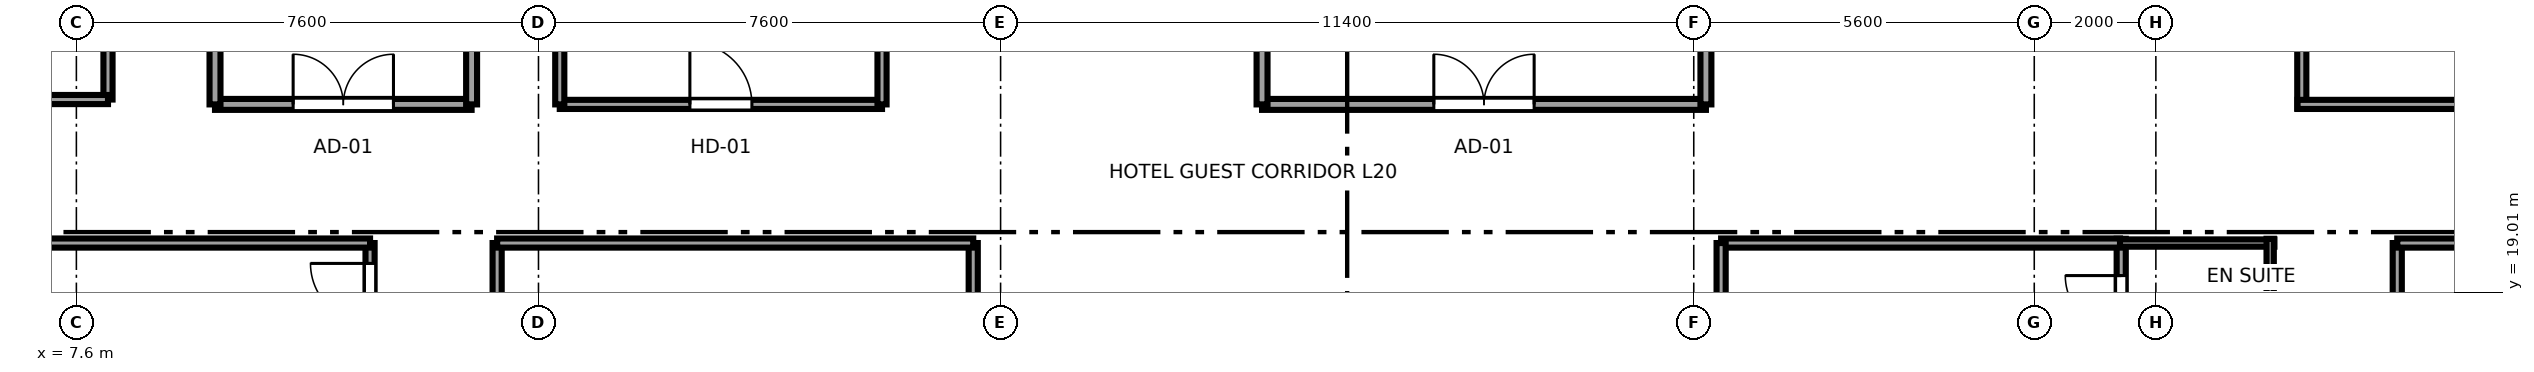
"""IFC4 building model, lengths in metres.
Left out: names, types, materials, properties, quantities, classifications, styles, units other than length and angle.
Written with IfcOpenShell. Run it as: python <this file> out.ifc"""

import sys

from ifc_helpers import new_model, si_unit, direction, frame, frame_2d, origin, place, context, subcontext, project, spatial, rectangle, extrude, source, transform, mapped, element, fill, save


model = new_model("IFC4")
c1 = context("Model", 3, precision=1e-05, world=origin(), true_north=direction((0.0, 1.0)))
c2 = subcontext(c1, "Body", "Model", "MODEL_VIEW")
j1 = project(units=[si_unit("LENGTHUNIT", "METRE"), si_unit("PLANEANGLEUNIT", "RADIAN")], contexts=[c1])
p1 = place(None, origin())
s1 = spatial("IfcSite", under=j1, at=p1, CompositionType="ELEMENT")
p2 = place(p1, origin())
s2 = spatial("IfcBuilding", under=s1, at=p2, CompositionType="ELEMENT")
p3 = place(p2, frame((0.0, 0.0, 81.7)))
s3 = spatial("IfcBuildingStorey", under=s2, at=p3, CompositionType="ELEMENT", Elevation=81.7)
p4 = place(p3, frame((41.23, 17.9, 0.0), z_axis=(0.0, 0.0, 1.0), x_axis=(0.0, 1.0, 0.0)))
e1 = element("IfcWall", 1, at=p4, inside=s3, PredefinedType="PARTITIONING", context=c2, shape_type="SweptSolid", body=[
    extrude(rectangle(XDim=1.99, YDim=0.15, at=frame_2d((0.995, 0.0))), origin(), (0.0, 0.0, 1.0), 3.37),
])
p5 = place(p4, frame((0.465, 0.0, 0.0)))
e2 = element("IfcOpeningElement", 2, at=p5, cuts=e1, PredefinedType="OPENING", context=c2, shape_type="SweptSolid", body=[
    extrude(rectangle(XDim=0.92, YDim=2.01, at=frame_2d((0.46, 1.005))), frame((0.0, 0.085, 0.0), z_axis=(0.0, -1.0, 0.0), x_axis=(1.0, 0.0, 0.0)), (0.0, 0.0, 1.0), 0.17),
])
p6 = place(p3, frame((41.16, 19.82, 0.0), z_axis=(0.0, 0.0, 1.0), x_axis=(1.0, 0.0, 0.0)))
e3 = element("IfcWall", 3, at=p6, inside=s3, PredefinedType="PLUMBINGWALL", context=c2, shape_type="SweptSolid", body=[
    extrude(rectangle(XDim=2.59, YDim=0.12, at=frame_2d((1.295, 0.0))), origin(), (0.0, 0.0, 1.0), 3.37),
])
p7 = place(p3, frame((43.68, 17.9, 0.0), z_axis=(0.0, 0.0, 1.0), x_axis=(0.0, 1.0, 0.0)))
e4 = element("IfcWall", 4, at=p7, inside=s3, PredefinedType="PLUMBINGWALL", context=c2, shape_type="SweptSolid", body=[
    extrude(rectangle(XDim=1.99, YDim=0.12, at=frame_2d((0.995, 0.0))), origin(), (0.0, 0.0, 1.0), 3.37),
])
p8 = place(p3, frame((12.43, 18.21, 0.0), z_axis=(0.0, 0.0, 1.0), x_axis=(0.0, 1.0, 0.0)))
e5 = element("IfcWall", 5, at=p8, inside=s3, PredefinedType="PARTITIONING", context=c2, shape_type="SweptSolid", body=[
    extrude(rectangle(XDim=1.61, YDim=0.15, at=frame_2d((0.805, 0.0))), origin(), (0.0, 0.0, 1.0), 3.37),
])
p9 = place(p8, frame((0.295, 0.0, 0.0)))
e6 = element("IfcOpeningElement", 6, at=p9, cuts=e5, PredefinedType="OPENING", context=c2, shape_type="SweptSolid", body=[
    extrude(rectangle(XDim=0.98, YDim=2.12, at=frame_2d((0.49, 1.06))), frame((0.0, 0.085, 0.0), z_axis=(0.0, -1.0, 0.0), x_axis=(1.0, 0.0, 0.0)), (0.0, 0.0, 1.0), 0.17),
])
p10 = place(p3, frame((0.405, 19.82, 0.0), z_axis=(0.0, 0.0, 1.0), x_axis=(1.0, 0.0, 0.0)))
e7 = element("IfcWall", 7, at=p10, inside=s3, PredefinedType="PARTITIONING", context=c2, shape_type="SweptSolid", body=[
    extrude(rectangle(XDim=12.025, YDim=0.15, at=frame_2d((6.012, 0.0))), origin(), (0.0, 0.0, 1.0), 3.37),
])
p11 = place(p3, frame((14.52, 12.41, 0.0), z_axis=(0.0, 0.0, 1.0), x_axis=(0.0, 1.0, 0.0)))
e8 = element("IfcWall", 8, at=p11, inside=s3, PredefinedType="PARTITIONING", context=c2, shape_type="SweptSolid", body=[
    extrude(rectangle(XDim=7.41, YDim=0.15, at=frame_2d((3.705, 0.0))), origin(), (0.0, 0.0, 1.0), 3.37),
])
p12 = place(p11, frame((4.995, 0.0, 0.0)))
e9 = element("IfcOpeningElement", 9, at=p12, cuts=e8, PredefinedType="OPENING", context=c2, shape_type="SweptSolid", body=[
    extrude(rectangle(XDim=0.98, YDim=2.12, at=frame_2d((0.49, 1.06))), frame((0.0, 0.085, 0.0), z_axis=(0.0, -1.0, 0.0), x_axis=(1.0, 0.0, 0.0)), (0.0, 0.0, 1.0), 0.17),
])
p13 = place(p3, frame((22.35, 10.08, 0.0), z_axis=(0.0, 0.0, 1.0), x_axis=(0.0, 1.0, 0.0)))
e10 = element("IfcWall", 10, at=p13, inside=s3, PredefinedType="PARTITIONING", context=c2, shape_type="SweptSolid", body=[
    extrude(rectangle(XDim=9.74, YDim=0.15, at=frame_2d((4.87, 0.0))), origin(), (0.0, 0.0, 1.0), 3.37),
])
p14 = place(p3, frame((14.52, 19.82, 0.0), z_axis=(0.0, 0.0, 1.0), x_axis=(1.0, 0.0, 0.0)))
e11 = element("IfcWall", 11, at=p14, inside=s3, PredefinedType="PARTITIONING", context=c2, shape_type="SweptSolid", body=[
    extrude(rectangle(XDim=7.83, YDim=0.15, at=frame_2d((3.915, 0.0))), origin(), (0.0, 0.0, 1.0), 3.37),
])
p15 = place(p3, frame((34.65, 19.82, 0.0), z_axis=(0.0, 0.0, 1.0), x_axis=(1.0, 0.0, 0.0)))
e12 = element("IfcWall", 12, at=p15, inside=s3, PredefinedType="PARTITIONING", context=c2, shape_type="SweptSolid", body=[
    extrude(rectangle(XDim=6.56, YDim=0.15, at=frame_2d((3.28, 0.0))), origin(), (0.0, 0.0, 1.0), 3.37),
])
p16 = place(p3, frame((34.65, 15.08, 0.0), z_axis=(0.0, 0.0, 1.0), x_axis=(0.0, 1.0, 0.0)))
e13 = element("IfcWall", 13, at=p16, inside=s3, PredefinedType="PARTITIONING", context=c2, shape_type="SweptSolid", body=[
    extrude(rectangle(XDim=4.74, YDim=0.15, at=frame_2d((2.37, 0.0))), origin(), (0.0, 0.0, 1.0), 3.37),
])
p17 = place(p3, frame((45.77, 12.41, 0.0), z_axis=(0.0, 0.0, 1.0), x_axis=(0.0, 1.0, 0.0)))
e14 = element("IfcWall", 14, at=p17, inside=s3, PredefinedType="PARTITIONING", context=c2, shape_type="SweptSolid", body=[
    extrude(rectangle(XDim=7.41, YDim=0.15, at=frame_2d((3.705, 0.0))), origin(), (0.0, 0.0, 1.0), 3.37),
])
p18 = place(p17, frame((3.195, 0.0, 0.0)))
e15 = element("IfcOpeningElement", 15, at=p18, cuts=e14, PredefinedType="OPENING", context=c2, shape_type="SweptSolid", body=[
    extrude(rectangle(XDim=0.98, YDim=2.12, at=frame_2d((0.49, 1.06))), frame((0.0, 0.085, 0.0), z_axis=(0.0, -1.0, 0.0), x_axis=(1.0, 0.0, 0.0)), (0.0, 0.0, 1.0), 0.17),
])
p19 = place(p3, frame((45.77, 19.82, 0.0), z_axis=(0.0, 0.0, 1.0), x_axis=(1.0, 0.0, 0.0)))
e16 = element("IfcWall", 16, at=p19, inside=s3, PredefinedType="PARTITIONING", context=c2, shape_type="SweptSolid", body=[
    extrude(rectangle(XDim=10.825, YDim=0.15, at=frame_2d((5.413, 0.0))), origin(), (0.0, 0.0, 1.0), 3.37),
])
p20 = place(p3, frame((8.12, 22.18, 0.0), z_axis=(0.0, 0.0, 1.0), x_axis=(0.0, 1.0, 0.0)))
e17 = element("IfcWall", 17, at=p20, inside=s3, PredefinedType="PARTITIONING", context=c2, shape_type="SweptSolid", body=[
    extrude(rectangle(XDim=5.24, YDim=0.15, at=frame_2d((2.62, 0.0))), origin(), (0.0, 0.0, 1.0), 3.37),
])
p21 = place(p20, frame((3.48, 0.0, 0.0)))
e18 = element("IfcOpeningElement", 18, at=p21, cuts=e17, PredefinedType="OPENING", context=c2, shape_type="SweptSolid", body=[
    extrude(rectangle(XDim=0.98, YDim=2.12, at=frame_2d((0.49, 1.06))), frame((0.0, 0.085, 0.0), z_axis=(0.0, -1.0, 0.0), x_axis=(1.0, 0.0, 0.0)), (0.0, 0.0, 1.0), 0.17),
])
p22 = place(p3, frame((0.405, 22.18, 0.0), z_axis=(0.0, 0.0, 1.0), x_axis=(1.0, 0.0, 0.0)))
e19 = element("IfcWall", 19, at=p22, inside=s3, PredefinedType="PARTITIONING", context=c2, shape_type="SweptSolid", body=[
    extrude(rectangle(XDim=7.715, YDim=0.15, at=frame_2d((3.857, 0.0))), origin(), (0.0, 0.0, 1.0), 3.37),
])
p23 = place(p3, frame((44.2, 22.03, 0.0), z_axis=(0.0, 0.0, 1.0), x_axis=(0.0, 1.0, 0.0)))
e20 = element("IfcWall", 20, at=p23, inside=s3, PredefinedType="PARTITIONING", context=c2, shape_type="SweptSolid", body=[
    extrude(rectangle(XDim=3.94, YDim=0.15, at=frame_2d((1.97, 0.0))), origin(), (0.0, 0.0, 1.0), 3.37),
])
p24 = place(p23, frame((1.34, 0.0, 0.0)))
e21 = element("IfcOpeningElement", 21, at=p24, cuts=e20, PredefinedType="OPENING", context=c2, shape_type="SweptSolid", body=[
    extrude(rectangle(XDim=0.92, YDim=2.01, at=frame_2d((0.46, 1.005))), frame((0.0, 0.085, 0.0), z_axis=(0.0, -1.0, 0.0), x_axis=(1.0, 0.0, 0.0)), (0.0, 0.0, 1.0), 0.17),
])
p25 = place(p3, frame((44.13, 22.1, 0.0), z_axis=(0.0, 0.0, 1.0), x_axis=(1.0, 0.0, 0.0)))
e22 = element("IfcWall", 22, at=p25, inside=s3, PredefinedType="PARTITIONING", context=c2, shape_type="SweptSolid", body=[
    extrude(rectangle(XDim=4.54, YDim=0.15, at=frame_2d((2.27, 0.0))), origin(), (0.0, 0.0, 1.0), 3.37),
])
p26 = place(p3, frame((9.88, 22.1, 0.0), z_axis=(0.0, 0.0, 1.0), x_axis=(1.0, 0.0, 0.0)))
e23 = element("IfcWall", 23, at=p26, inside=s3, PredefinedType="PARTITIONING", context=c2, shape_type="SweptSolid", body=[
    extrude(rectangle(XDim=4.22, YDim=0.18, at=frame_2d((2.11, 0.0))), origin(), (0.0, 0.0, 1.0), 3.37),
])
p27 = place(p26, frame((1.285, 0.0, 0.0)))
e24 = element("IfcOpeningElement", 24, at=p27, cuts=e23, PredefinedType="OPENING", context=c2, shape_type="SweptSolid", body=[
    extrude(rectangle(XDim=1.65, YDim=2.15, at=frame_2d((0.825, 1.075))), frame((0.0, 0.1, 0.0), z_axis=(0.0, -1.0, 0.0), x_axis=(1.0, 0.0, 0.0)), (0.0, 0.0, 1.0), 0.2),
])
for number, where, z_axis, x_axis in (
    (25, (9.88, 22.1, 0.0), (0.0, 0.0, 1.0), (0.0, 1.0, 0.0)),
    (26, (14.1, 22.1, 0.0), (0.0, 0.0, 1.0), (0.0, 1.0, 0.0)),
):
    element("IfcWall", number, at=place(p3, frame(where, z_axis=z_axis, x_axis=x_axis)), inside=s3, PredefinedType="PARTITIONING", context=c2, shape_type="SweptSolid", body=[
        extrude(rectangle(XDim=7.65, YDim=0.18, at=frame_2d((3.825, 0.0))), origin(), (0.0, 0.0, 1.0), 3.37),
    ])
p28 = place(p3, frame((27.1, 22.1, 0.0), z_axis=(0.0, 0.0, 1.0), x_axis=(1.0, 0.0, 0.0)))
e27 = element("IfcWall", 27, at=p28, inside=s3, PredefinedType="PARTITIONING", context=c2, shape_type="SweptSolid", body=[
    extrude(rectangle(XDim=7.3, YDim=0.18, at=frame_2d((3.65, 0.0))), origin(), (0.0, 0.0, 1.0), 3.37),
])
p29 = place(p28, frame((2.825, 0.0, 0.0)))
e28 = element("IfcOpeningElement", 28, at=p29, cuts=e27, PredefinedType="OPENING", context=c2, shape_type="SweptSolid", body=[
    extrude(rectangle(XDim=1.65, YDim=2.15, at=frame_2d((0.825, 1.075))), frame((0.0, 0.1, 0.0), z_axis=(0.0, -1.0, 0.0), x_axis=(1.0, 0.0, 0.0)), (0.0, 0.0, 1.0), 0.2),
])
for number, where, z_axis, x_axis in (
    (29, (27.1, 22.1, 0.0), (0.0, 0.0, 1.0), (0.0, 1.0, 0.0)),
    (30, (34.4, 22.1, 0.0), (0.0, 0.0, 1.0), (0.0, 1.0, 0.0)),
):
    element("IfcWall", number, at=place(p3, frame(where, z_axis=z_axis, x_axis=x_axis)), inside=s3, PredefinedType="PARTITIONING", context=c2, shape_type="SweptSolid", body=[
        extrude(rectangle(XDim=7.7, YDim=0.18, at=frame_2d((3.85, 0.0))), origin(), (0.0, 0.0, 1.0), 3.37),
    ])
p30 = place(p3, frame((15.55, 22.1, 0.0), z_axis=(0.0, 0.0, 1.0), x_axis=(1.0, 0.0, 0.0)))
e31 = element("IfcWall", 31, at=p30, inside=s3, PredefinedType="PARTITIONING", context=c2, shape_type="SweptSolid", body=[
    extrude(rectangle(XDim=5.3, YDim=0.15, at=frame_2d((2.65, 0.0))), origin(), (0.0, 0.0, 1.0), 3.37),
])
p31 = place(p30, frame((2.14, 0.0, 0.0)))
e32 = element("IfcOpeningElement", 32, at=p31, cuts=e31, PredefinedType="OPENING", context=c2, shape_type="SweptSolid", body=[
    extrude(rectangle(XDim=1.02, YDim=2.03, at=frame_2d((0.51, 1.015))), frame((0.0, 0.085, 0.0), z_axis=(0.0, -1.0, 0.0), x_axis=(1.0, 0.0, 0.0)), (0.0, 0.0, 1.0), 0.17),
])
for number, where, z_axis, x_axis in (
    (33, (15.55, 22.1, 0.0), (0.0, 0.0, 1.0), (0.0, 1.0, 0.0)),
    (34, (20.85, 22.1, 0.0), (0.0, 0.0, 1.0), (0.0, 1.0, 0.0)),
):
    element("IfcWall", number, at=place(p3, frame(where, z_axis=z_axis, x_axis=x_axis)), inside=s3, PredefinedType="PARTITIONING", context=c2, shape_type="SweptSolid", body=[
        extrude(rectangle(XDim=7.7, YDim=0.15, at=frame_2d((3.85, 0.0))), origin(), (0.0, 0.0, 1.0), 3.37),
    ])
m1 = source(origin(), c2, "Body", "SweptSolid", [
    extrude(rectangle(XDim=0.92, YDim=2.01, at=frame_2d((0.46, 1.005))), frame((0.0, 0.025, 0.0), z_axis=(0.0, -1.0, 0.0), x_axis=(1.0, 0.0, 0.0)), (0.0, 0.0, 1.0), 0.05),
])
p32 = place(p5, origin())
e35 = element("IfcDoor", 35, at=p32, inside=s3, OperationType="SINGLE_SWING_RIGHT", PredefinedType="DOOR", context=c2, shape_type="MappedRepresentation", body=[
    mapped(m1, transform((0.0, 0.0, 0.0), x_axis=(1.0, 0.0, 0.0), y_axis=(0.0, 1.0, 0.0), z_axis=(0.0, 0.0, 1.0), scale=1.0)),
])
fill(e2, e35)
m2 = source(origin(), c2, "Body", "SweptSolid", [
    extrude(rectangle(XDim=0.98, YDim=2.12, at=frame_2d((0.49, 1.06))), frame((0.0, 0.025, 0.0), z_axis=(0.0, -1.0, 0.0), x_axis=(1.0, 0.0, 0.0)), (0.0, 0.0, 1.0), 0.05),
])
p33 = place(p9, origin())
e36 = element("IfcDoor", 36, at=p33, inside=s3, OperationType="SINGLE_SWING_RIGHT", PredefinedType="DOOR", context=c2, shape_type="MappedRepresentation", body=[
    mapped(m2, transform((0.0, 0.0, 0.0), x_axis=(1.0, 0.0, 0.0), y_axis=(0.0, 1.0, 0.0), z_axis=(0.0, 0.0, 1.0), scale=1.0)),
])
fill(e6, e36)
m3 = source(origin(), c2, "Body", "SweptSolid", [
    extrude(rectangle(XDim=1.65, YDim=2.15, at=frame_2d((0.825, 1.075))), frame((0.0, 0.025, 0.0), z_axis=(0.0, -1.0, 0.0), x_axis=(1.0, 0.0, 0.0)), (0.0, 0.0, 1.0), 0.05),
])
p34 = place(p27, origin())
e37 = element("IfcDoor", 37, at=p34, inside=s3, OperationType="DOUBLE_DOOR_SINGLE_SWING", PredefinedType="DOOR", context=c2, shape_type="MappedRepresentation", body=[
    mapped(m3, transform((0.0, 0.0, 0.0), x_axis=(1.0, 0.0, 0.0), y_axis=(0.0, 1.0, 0.0), z_axis=(0.0, 0.0, 1.0), scale=1.0)),
])
fill(e24, e37)
p35 = place(p29, origin())
e38 = element("IfcDoor", 38, at=p35, inside=s3, OperationType="DOUBLE_DOOR_SINGLE_SWING", PredefinedType="DOOR", context=c2, shape_type="MappedRepresentation", body=[
    mapped(m3, transform((0.0, 0.0, 0.0), x_axis=(1.0, 0.0, 0.0), y_axis=(0.0, 1.0, 0.0), z_axis=(0.0, 0.0, 1.0), scale=1.0)),
])
fill(e28, e38)
m4 = source(origin(), c2, "Body", "SweptSolid", [
    extrude(rectangle(XDim=1.02, YDim=2.03, at=frame_2d((0.51, 1.015))), frame((0.0, 0.025, 0.0), z_axis=(0.0, -1.0, 0.0), x_axis=(1.0, 0.0, 0.0)), (0.0, 0.0, 1.0), 0.05),
])
p36 = place(p31, origin())
e39 = element("IfcDoor", 39, at=p36, inside=s3, OperationType="SINGLE_SWING_LEFT", PredefinedType="DOOR", context=c2, shape_type="MappedRepresentation", body=[
    mapped(m4, transform((0.0, 0.0, 0.0), x_axis=(1.0, 0.0, 0.0), y_axis=(0.0, 1.0, 0.0), z_axis=(0.0, 0.0, 1.0), scale=1.0)),
])
fill(e32, e39)
save(model, sys.argv[1])
